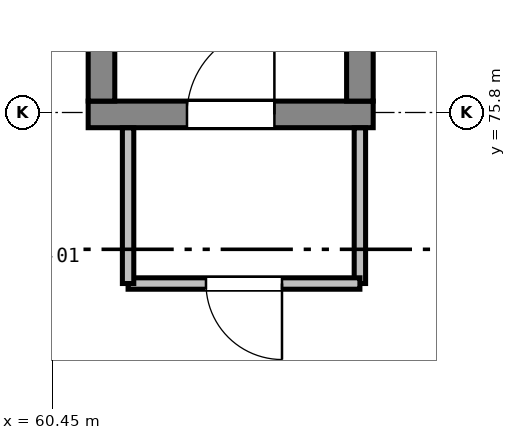
"""IFC4 building model, lengths in metres.
Left out: names, types, materials, properties, quantities, classifications, styles, units other than length and angle.
Written with IfcOpenShell. Run it as: python <this file> out.ifc"""

import sys

from ifc_helpers import new_model, si_unit, direction, frame, frame_2d, origin, place, context, subcontext, project, spatial, rectangle, extrude, element, fill, save


model = new_model("IFC4")
c1 = context("Model", 3, precision=1e-05, world=origin(), true_north=direction((0.0, 1.0)))
c2 = subcontext(c1, "Body", "Model", "MODEL_VIEW")
j1 = project(units=[si_unit("LENGTHUNIT", "METRE"), si_unit("PLANEANGLEUNIT", "RADIAN")], contexts=[c1])
p1 = place(None, origin())
s1 = spatial("IfcSite", under=j1, at=p1, CompositionType="ELEMENT")
p2 = place(p1, origin())
s2 = spatial("IfcBuilding", under=s1, at=p2, CompositionType="ELEMENT")
p3 = place(p2, frame((0.0, 0.0, 10.2)))
s3 = spatial("IfcBuildingStorey", under=s2, at=p3, CompositionType="ELEMENT", Elevation=10.2)
p4 = place(p3, frame((60.925, 75.775, 0.0), z_axis=(0.0, 0.0, 1.0), x_axis=(1.0, 0.0, 0.0)))
e1 = element("IfcWall", 1, at=p4, inside=s3, PredefinedType="SHEAR", context=c2, shape_type="SweptSolid", body=[
    extrude(rectangle(XDim=3.75, YDim=0.35, at=frame_2d((1.875, 0.0))), origin(), (0.0, 0.0, 1.0), 4.8),
])
p5 = place(p4, frame((1.3, 0.0, 0.0)))
e2 = element("IfcOpeningElement", 2, at=p5, cuts=e1, PredefinedType="OPENING", context=c2, shape_type="SweptSolid", body=[
    extrude(rectangle(XDim=1.15, YDim=2.15, at=frame_2d((0.575, 1.075))), frame((0.0, 0.185, 0.0), z_axis=(0.0, -1.0, 0.0), x_axis=(1.0, 0.0, 0.0)), (0.0, 0.0, 1.0), 0.37),
])
for number, where, z_axis, x_axis in (
    (3, (61.1, 75.95, 0.0), (0.0, 0.0, 1.0), (0.0, 1.0, 0.0)),
    (4, (64.5, 75.95, 0.0), (0.0, 0.0, 1.0), (0.0, 1.0, 0.0)),
):
    element("IfcWall", number, at=place(p3, frame(where, z_axis=z_axis, x_axis=x_axis)), inside=s3, PredefinedType="SHEAR", context=c2, shape_type="SweptSolid", body=[
        extrude(rectangle(XDim=7.275, YDim=0.35, at=frame_2d((3.638, 0.0))), origin(), (0.0, 0.0, 1.0), 4.8),
    ])
p6 = place(p3, frame((64.5, 75.598, 0.0), z_axis=(0.0, 0.0, 1.0), x_axis=(0.0, -1.0, 0.0)))
e5 = element("IfcWall", 5, at=p6, inside=s3, PredefinedType="PARTITIONING", context=c2, shape_type="SweptSolid", body=[
    extrude(rectangle(XDim=2.048, YDim=0.15, at=frame_2d((1.024, 0.0))), origin(), (0.0, 0.0, 1.0), 4.135),
])
p7 = place(p3, frame((64.5, 73.55, 0.0), z_axis=(0.0, 0.0, 1.0), x_axis=(-1.0, 0.0, 0.0)))
e6 = element("IfcWall", 6, at=p7, inside=s3, PredefinedType="PARTITIONING", context=c2, shape_type="SweptSolid", body=[
    extrude(rectangle(XDim=3.05, YDim=0.15, at=frame_2d((1.525, 0.0))), origin(), (0.0, 0.0, 1.0), 4.495),
])
p8 = place(p7, frame((1.025, 0.0, 0.0)))
e7 = element("IfcOpeningElement", 7, at=p8, cuts=e6, PredefinedType="OPENING", context=c2, shape_type="SweptSolid", body=[
    extrude(rectangle(XDim=1.0, YDim=2.1, at=frame_2d((0.5, 1.05))), frame((0.0, 0.085, 0.0), z_axis=(0.0, -1.0, 0.0), x_axis=(1.0, 0.0, 0.0)), (0.0, 0.0, 1.0), 0.17),
])
p9 = place(p3, frame((61.45, 73.55, 0.0), z_axis=(0.0, 0.0, 1.0), x_axis=(0.0, 1.0, 0.0)))
e8 = element("IfcWall", 8, at=p9, inside=s3, PredefinedType="PARTITIONING", context=c2, shape_type="SweptSolid", body=[
    extrude(rectangle(XDim=2.048, YDim=0.15, at=frame_2d((1.024, 0.0))), origin(), (0.0, 0.0, 1.0), 4.135),
])
p10 = place(p5, origin())
e9 = element("IfcDoor", 9, at=p10, inside=s3, OperationType="SINGLE_SWING_RIGHT", PredefinedType="DOOR", context=c2, shape_type="SweptSolid", body=[
    extrude(rectangle(XDim=1.15, YDim=2.15, at=frame_2d((0.575, 1.075))), frame((0.0, 0.025, 0.0), z_axis=(0.0, -1.0, 0.0), x_axis=(1.0, 0.0, 0.0)), (0.0, 0.0, 1.0), 0.05),
])
fill(e2, e9)
p11 = place(p8, origin())
e10 = element("IfcDoor", 10, at=p11, inside=s3, OperationType="SINGLE_SWING_LEFT", PredefinedType="DOOR", context=c2, shape_type="SweptSolid", body=[
    extrude(rectangle(XDim=1.0, YDim=2.1, at=frame_2d((0.5, 1.05))), frame((0.0, 0.025, 0.0), z_axis=(0.0, -1.0, 0.0), x_axis=(1.0, 0.0, 0.0)), (0.0, 0.0, 1.0), 0.05),
])
fill(e7, e10)
save(model, sys.argv[1])
